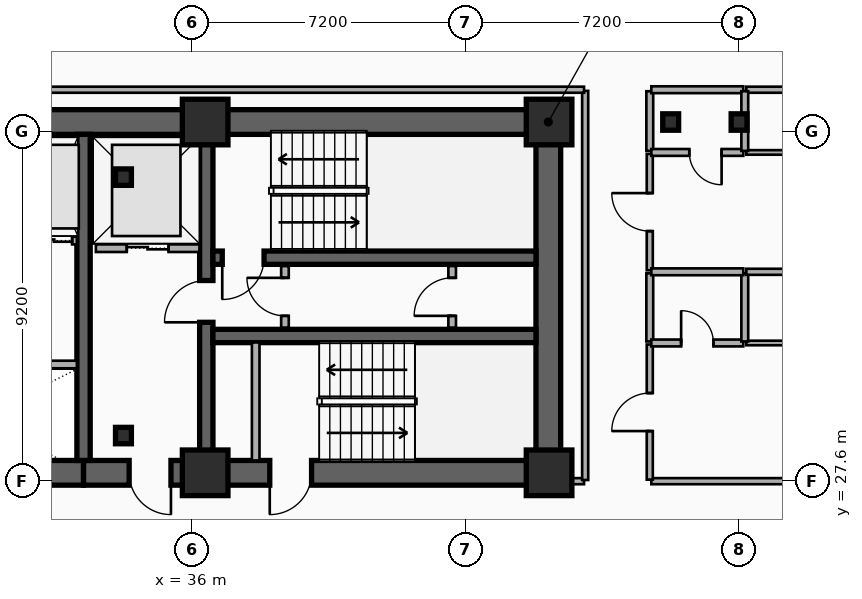
"""IFC4 building model, lengths in metres.
Left out: names, types, materials, properties, quantities, classifications, styles, units other than length and angle.
Written with IfcOpenShell. Run it as: python <this file> out.ifc"""

import sys

from ifc_helpers import new_model, si_unit, direction, frame, frame_2d, origin, origin_2d, place, context, subcontext, project, spatial, rectangle, i_section, extrude, element, fill, save


model = new_model("IFC4")
c1 = context("Model", 3, precision=1e-05, world=origin(), true_north=direction((0.0, 1.0)))
c2 = subcontext(c1, "Body", "Model", "MODEL_VIEW")
j1 = project(units=[si_unit("LENGTHUNIT", "METRE"), si_unit("PLANEANGLEUNIT", "RADIAN")], contexts=[c1])
p1 = place(None, origin())
s1 = spatial("IfcSite", under=j1, at=p1, CompositionType="ELEMENT")
p2 = place(p1, origin())
s2 = spatial("IfcBuilding", under=s1, at=p2, CompositionType="ELEMENT")
p3 = place(p2, frame((0.0, 0.0, 104.8)))
s3 = spatial("IfcBuildingStorey", under=s2, at=p3, CompositionType="ELEMENT", Elevation=104.8)
p4 = place(p3, frame((12.15, 37.05, 0.0), z_axis=(0.0, 0.0, 1.0), x_axis=(1.0, 0.0, 0.0)))
e1 = element("IfcWall", 1, at=p4, inside=s3, PredefinedType="SHEAR", context=c2, shape_type="SweptSolid", body=[
    extrude(rectangle(XDim=33.23, YDim=0.65, at=frame_2d((16.615, 0.0))), origin(), (0.0, 0.0, 1.0), 3.5),
])
p5 = place(p3, frame((33.15, 27.82, 0.0), z_axis=(0.0, 0.0, 1.0), x_axis=(-1.0, 0.0, 0.0)))
e2 = element("IfcWall", 2, at=p5, inside=s3, PredefinedType="SHEAR", context=c2, shape_type="SweptSolid", body=[
    extrude(rectangle(XDim=11.97, YDim=0.65, at=frame_2d((5.985, 0.0))), origin(), (0.0, 0.0, 1.0), 3.5),
])
p6 = place(p5, frame((6.1, 0.0, 0.0)))
e3 = element("IfcOpeningElement", 3, at=p6, cuts=e2, PredefinedType="OPENING", context=c2, shape_type="SweptSolid", body=[
    extrude(rectangle(XDim=1.6, YDim=2.2, at=frame_2d((0.8, 1.1))), frame((0.0, 0.335, 0.0), z_axis=(0.0, -1.0, 0.0), x_axis=(1.0, 0.0, 0.0)), (0.0, 0.0, 1.0), 0.67),
])
p7 = place(p3, frame((45.38, 27.82, 0.0), z_axis=(0.0, 0.0, 1.0), x_axis=(-1.0, 0.0, 0.0)))
e4 = element("IfcWall", 4, at=p7, inside=s3, PredefinedType="SHEAR", context=c2, shape_type="SweptSolid", body=[
    extrude(rectangle(XDim=12.23, YDim=0.65, at=frame_2d((6.115, 0.0))), origin(), (0.0, 0.0, 1.0), 3.5),
])
p8 = place(p7, frame((9.93, 0.0, 0.0)))
e5 = element("IfcOpeningElement", 5, at=p8, cuts=e4, PredefinedType="OPENING", context=c2, shape_type="SweptSolid", body=[
    extrude(rectangle(XDim=1.1, YDim=2.15, at=frame_2d((0.55, 1.075))), frame((0.0, 0.335, 0.0), z_axis=(0.0, -1.0, 0.0), x_axis=(1.0, 0.0, 0.0)), (0.0, 0.0, 1.0), 0.67),
])
p9 = place(p7, frame((6.23, 0.0, 0.0)))
e6 = element("IfcOpeningElement", 6, at=p9, cuts=e4, PredefinedType="OPENING", context=c2, shape_type="SweptSolid", body=[
    extrude(rectangle(XDim=1.1, YDim=2.15, at=frame_2d((0.55, 1.075))), frame((0.0, 0.335, 0.0), z_axis=(0.0, -1.0, 0.0), x_axis=(1.0, 0.0, 0.0)), (0.0, 0.0, 1.0), 0.67),
])
p10 = place(p3, frame((45.38, 28.145, 0.0), z_axis=(0.0, 0.0, 1.0), x_axis=(0.0, 1.0, 0.0)))
e7 = element("IfcWall", 7, at=p10, inside=s3, PredefinedType="SHEAR", context=c2, shape_type="SweptSolid", body=[
    extrude(rectangle(XDim=8.58, YDim=0.65, at=frame_2d((4.29, 0.0))), origin(), (0.0, 0.0, 1.0), 3.5),
])
p11 = place(p3, frame((33.15, 28.145, 0.0), z_axis=(0.0, 0.0, 1.0), x_axis=(0.0, 1.0, 0.0)))
e8 = element("IfcWall", 8, at=p11, inside=s3, PredefinedType="SHEAR", context=c2, shape_type="SweptSolid", body=[
    extrude(rectangle(XDim=8.58, YDim=0.35, at=frame_2d((4.29, 0.0))), origin(), (0.0, 0.0, 1.0), 3.5),
])
p12 = place(p3, frame((36.38, 28.145, 0.0), z_axis=(0.0, 0.0, 1.0), x_axis=(0.0, 1.0, 0.0)))
e9 = element("IfcWall", 9, at=p12, inside=s3, PredefinedType="SHEAR", context=c2, shape_type="SweptSolid", body=[
    extrude(rectangle(XDim=8.58, YDim=0.35, at=frame_2d((4.29, 0.0))), origin(), (0.0, 0.0, 1.0), 3.5),
])
p13 = place(p12, frame((3.635, 0.0, 0.0)))
e10 = element("IfcOpeningElement", 10, at=p13, cuts=e9, PredefinedType="OPENING", context=c2, shape_type="SweptSolid", body=[
    extrude(rectangle(XDim=1.1, YDim=2.15, at=frame_2d((0.55, 1.075))), frame((0.0, 0.185, 0.0), z_axis=(0.0, -1.0, 0.0), x_axis=(1.0, 0.0, 0.0)), (0.0, 0.0, 1.0), 0.37),
])
p14 = place(p3, frame((45.055, 33.48, 0.0), z_axis=(0.0, 0.0, 1.0), x_axis=(-1.0, 0.0, 0.0)))
e11 = element("IfcWall", 11, at=p14, inside=s3, PredefinedType="SHEAR", context=c2, shape_type="SweptSolid", body=[
    extrude(rectangle(XDim=8.5, YDim=0.35, at=frame_2d((4.25, 0.0))), origin(), (0.0, 0.0, 1.0), 3.5),
])
p15 = place(p14, frame((7.155, 0.0, 0.0)))
e12 = element("IfcOpeningElement", 12, at=p15, cuts=e11, PredefinedType="OPENING", context=c2, shape_type="SweptSolid", body=[
    extrude(rectangle(XDim=1.1, YDim=2.15, at=frame_2d((0.55, 1.075))), frame((0.0, 0.185, 0.0), z_axis=(0.0, -1.0, 0.0), x_axis=(1.0, 0.0, 0.0)), (0.0, 0.0, 1.0), 0.37),
])
p16 = place(p3, frame((36.555, 31.42, 0.0), z_axis=(0.0, 0.0, 1.0), x_axis=(1.0, 0.0, 0.0)))
e13 = element("IfcWall", 13, at=p16, inside=s3, PredefinedType="SHEAR", context=c2, shape_type="SweptSolid", body=[
    extrude(rectangle(XDim=8.5, YDim=0.35, at=frame_2d((4.25, 0.0))), origin(), (0.0, 0.0, 1.0), 3.5),
])
for number, where, z_axis, x_axis in (
    (14, (34.2, 28.8, 0.0), (0.0, 0.0, 1.0), (1.0, 0.0, 0.0)),
    (15, (34.2, 35.6, 0.0), (0.0, 0.0, 1.0), (1.0, 0.0, 0.0)),
):
    element("IfcColumn", number, at=place(p3, frame(where, z_axis=z_axis, x_axis=x_axis)), inside=s3, PredefinedType="COLUMN", context=c2, shape_type="SweptSolid", body=[
        extrude(i_section(OverallWidth=0.418, OverallDepth=0.432, WebThickness=0.035, FlangeThickness=0.056, FilletRadius=0.015, at=origin_2d()), origin(), (0.0, 0.0, 1.0), 3.5),
    ])
for number, where, z_axis, x_axis in (
    (16, (36.35, 27.82, 0.0), (0.0, 0.0, 1.0), (1.0, 0.0, 0.0)),
    (17, (36.35, 37.05, 0.0), (0.0, 0.0, 1.0), (1.0, 0.0, 0.0)),
    (18, (45.4, 27.82, 0.0), (0.0, 0.0, 1.0), (1.0, 0.0, 0.0)),
    (19, (45.4, 37.05, 0.0), (0.0, 0.0, 1.0), (1.0, 0.0, 0.0)),
):
    element("IfcColumn", number, at=place(p3, frame(where, z_axis=z_axis, x_axis=x_axis)), inside=s3, PredefinedType="COLUMN", context=c2, shape_type="SweptSolid", body=[
        extrude(rectangle(XDim=1.2, YDim=1.2, at=origin_2d()), origin(), (0.0, 0.0, 1.0), 3.5),
    ])
for number, where, z_axis, x_axis in (
    (20, (48.6, 37.05, 0.0), (0.0, 0.0, 1.0), (1.0, 0.0, 0.0)),
    (21, (50.4, 37.05, 0.0), (0.0, 0.0, 1.0), (1.0, 0.0, 0.0)),
):
    element("IfcColumn", number, at=place(p3, frame(where, z_axis=z_axis, x_axis=x_axis)), inside=s3, PredefinedType="COLUMN", context=c2, shape_type="SweptSolid", body=[
        extrude(i_section(OverallWidth=0.418, OverallDepth=0.432, WebThickness=0.035, FlangeThickness=0.056, FilletRadius=0.015, at=origin_2d()), origin(), (0.0, 0.0, 1.0), 3.5),
    ])
p17 = place(p3, frame((33.475, 33.73, 0.0), z_axis=(0.0, 0.0, 1.0), x_axis=(1.0, 0.0, 0.0)))
e22 = element("IfcWall", 22, at=p17, inside=s3, PredefinedType="PARTITIONING", context=c2, shape_type="SweptSolid", body=[
    extrude(rectangle(XDim=2.725, YDim=0.2, at=frame_2d((1.362, 0.0))), origin(), (0.0, 0.0, 1.0), 2.212),
])
p18 = place(p17, frame((0.812, 0.0, 0.0)))
e23 = element("IfcOpeningElement", 23, at=p18, cuts=e22, PredefinedType="OPENING", context=c2, shape_type="SweptSolid", body=[
    extrude(rectangle(XDim=1.1, YDim=2.15, at=frame_2d((0.55, 1.075))), frame((0.0, 0.11, 0.0), z_axis=(0.0, -1.0, 0.0), x_axis=(1.0, 0.0, 0.0)), (0.0, 0.0, 1.0), 0.22),
])
p19 = place(p3, frame((31.775, 30.67, 0.0), z_axis=(0.0, 0.0, 1.0), x_axis=(1.0, 0.0, 0.0)))
e24 = element("IfcWall", 24, at=p19, inside=s3, PredefinedType="PARTITIONING", context=c2, shape_type="SweptSolid", body=[
    extrude(rectangle(XDim=1.2, YDim=0.2, at=frame_2d((0.6, 0.0))), origin(), (0.0, 0.0, 1.0), 2.62),
])
p20 = place(p3, frame((31.775, 33.93, 0.0), z_axis=(0.0, 0.0, 1.0), x_axis=(1.0, 0.0, 0.0)))
e25 = element("IfcWall", 25, at=p20, inside=s3, PredefinedType="PARTITIONING", context=c2, shape_type="SweptSolid", body=[
    extrude(rectangle(XDim=1.2, YDim=0.2, at=frame_2d((0.6, 0.0))), origin(), (0.0, 0.0, 1.0), 3.24),
])
p21 = place(p20, frame((0.125, 0.0, 0.0)))
e26 = element("IfcOpeningElement", 26, at=p21, cuts=e25, PredefinedType="OPENING", context=c2, shape_type="SweptSolid", body=[
    extrude(rectangle(XDim=0.95, YDim=2.15, at=frame_2d((0.475, 1.075))), frame((0.0, 0.11, 0.0), z_axis=(0.0, -1.0, 0.0), x_axis=(1.0, 0.0, 0.0)), (0.0, 0.0, 1.0), 0.22),
])
p22 = place(p3, frame((37.68, 28.145, 0.0), z_axis=(0.0, 0.0, 1.0), x_axis=(0.0, 1.0, 0.0)))
e27 = element("IfcWall", 27, at=p22, inside=s3, PredefinedType="PARTITIONING", context=c2, shape_type="SweptSolid", body=[
    extrude(rectangle(XDim=3.105, YDim=0.2, at=frame_2d((1.552, 0.0))), origin(), (0.0, 0.0, 1.0), 2.62),
])
p23 = place(p3, frame((38.45, 31.64, 0.0), z_axis=(0.0, 0.0, 1.0), x_axis=(0.0, 1.0, 0.0)))
e28 = element("IfcWall", 28, at=p23, inside=s3, PredefinedType="PARTITIONING", context=c2, shape_type="SweptSolid", body=[
    extrude(rectangle(XDim=1.62, YDim=0.2, at=frame_2d((0.81, 0.0))), origin(), (0.0, 0.0, 1.0), 3.24),
])
p24 = place(p23, frame((0.31, 0.0, 0.0)))
e29 = element("IfcOpeningElement", 29, at=p24, cuts=e28, PredefinedType="OPENING", context=c2, shape_type="SweptSolid", body=[
    extrude(rectangle(XDim=1.0, YDim=2.15, at=frame_2d((0.5, 1.075))), frame((0.0, 0.11, 0.0), z_axis=(0.0, -1.0, 0.0), x_axis=(1.0, 0.0, 0.0)), (0.0, 0.0, 1.0), 0.22),
])
p25 = place(p3, frame((42.85, 31.64, 0.0), z_axis=(0.0, 0.0, 1.0), x_axis=(0.0, 1.0, 0.0)))
e30 = element("IfcWall", 30, at=p25, inside=s3, PredefinedType="PARTITIONING", context=c2, shape_type="SweptSolid", body=[
    extrude(rectangle(XDim=1.62, YDim=0.2, at=frame_2d((0.81, 0.0))), origin(), (0.0, 0.0, 1.0), 3.24),
])
p26 = place(p25, frame((0.31, 0.0, 0.0)))
e31 = element("IfcOpeningElement", 31, at=p26, cuts=e30, PredefinedType="OPENING", context=c2, shape_type="SweptSolid", body=[
    extrude(rectangle(XDim=1.0, YDim=2.15, at=frame_2d((0.5, 1.075))), frame((0.0, 0.11, 0.0), z_axis=(0.0, -1.0, 0.0), x_axis=(1.0, 0.0, 0.0)), (0.0, 0.0, 1.0), 0.22),
])
p27 = place(p3, frame((48.09, 27.6, 0.0), z_axis=(0.0, 0.0, 1.0), x_axis=(1.0, 0.0, 0.0)))
e32 = element("IfcWall", 32, at=p27, inside=s3, PredefinedType="PARTITIONING", context=c2, shape_type="SweptSolid", body=[
    extrude(rectangle(XDim=9.25, YDim=0.16, at=frame_2d((4.625, 0.0))), origin(), (0.0, 0.0, 1.0), 2.57),
])
p28 = place(p27, frame((4.125, 0.0, 0.0)))
e33 = element("IfcOpeningElement", 33, at=p28, cuts=e32, PredefinedType="OPENING", context=c2, shape_type="SweptSolid", body=[
    extrude(rectangle(XDim=1.0, YDim=2.15, at=frame_2d((0.5, 1.075))), frame((0.0, 0.09, 0.0), z_axis=(0.0, -1.0, 0.0), x_axis=(1.0, 0.0, 0.0)), (0.0, 0.0, 1.0), 0.18),
])
p29 = place(p3, frame((48.05, 27.64, 0.0), z_axis=(0.0, 0.0, 1.0), x_axis=(0.0, 1.0, 0.0)))
e34 = element("IfcWall", 34, at=p29, inside=s3, PredefinedType="PARTITIONING", context=c2, shape_type="SweptSolid", body=[
    extrude(rectangle(XDim=3.556, YDim=0.16, at=frame_2d((1.778, 0.0))), origin(), (0.0, 0.0, 1.0), 3.24),
])
p30 = place(p29, frame((1.278, 0.0, 0.0)))
e35 = element("IfcOpeningElement", 35, at=p30, cuts=e34, PredefinedType="OPENING", context=c2, shape_type="SweptSolid", body=[
    extrude(rectangle(XDim=1.0, YDim=2.15, at=frame_2d((0.5, 1.075))), frame((0.0, 0.09, 0.0), z_axis=(0.0, -1.0, 0.0), x_axis=(1.0, 0.0, 0.0)), (0.0, 0.0, 1.0), 0.18),
])
p31 = place(p3, frame((48.05, 31.276, 0.0), z_axis=(0.0, 0.0, 1.0), x_axis=(0.0, 1.0, 0.0)))
e36 = element("IfcWall", 36, at=p31, inside=s3, PredefinedType="PLUMBINGWALL", context=c2, shape_type="SweptSolid", body=[
    extrude(rectangle(XDim=1.793, YDim=0.18, at=frame_2d((0.896, 0.0))), origin(), (0.0, 0.0, 1.0), 3.24),
])
p32 = place(p3, frame((48.05, 33.149, 0.0), z_axis=(0.0, 0.0, 1.0), x_axis=(0.0, 1.0, 0.0)))
e37 = element("IfcWall", 37, at=p32, inside=s3, PredefinedType="PARTITIONING", context=c2, shape_type="SweptSolid", body=[
    extrude(rectangle(XDim=3.061, YDim=0.16, at=frame_2d((1.531, 0.0))), origin(), (0.0, 0.0, 1.0), 3.24),
])
p33 = place(p32, frame((1.031, 0.0, 0.0)))
e38 = element("IfcOpeningElement", 38, at=p33, cuts=e37, PredefinedType="OPENING", context=c2, shape_type="SweptSolid", body=[
    extrude(rectangle(XDim=1.0, YDim=2.15, at=frame_2d((0.5, 1.075))), frame((0.0, 0.09, 0.0), z_axis=(0.0, -1.0, 0.0), x_axis=(1.0, 0.0, 0.0)), (0.0, 0.0, 1.0), 0.18),
])
p34 = place(p3, frame((48.05, 36.29, 0.0), z_axis=(0.0, 0.0, 1.0), x_axis=(0.0, 1.0, 0.0)))
e39 = element("IfcWall", 39, at=p34, inside=s3, PredefinedType="PLUMBINGWALL", context=c2, shape_type="SweptSolid", body=[
    extrude(rectangle(XDim=1.57, YDim=0.18, at=frame_2d((0.785, 0.0))), origin(), (0.0, 0.0, 1.0), 2.72),
])
p35 = place(p3, frame((48.09, 37.9, 0.0), z_axis=(0.0, 0.0, 1.0), x_axis=(1.0, 0.0, 0.0)))
e40 = element("IfcWall", 40, at=p35, inside=s3, PredefinedType="PLUMBINGWALL", context=c2, shape_type="SweptSolid", body=[
    extrude(rectangle(XDim=2.42, YDim=0.18, at=frame_2d((1.21, 0.0))), origin(), (0.0, 0.0, 1.0), 3.24),
])
p36 = place(p3, frame((50.59, 37.9, 0.0), z_axis=(0.0, 0.0, 1.0), x_axis=(1.0, 0.0, 0.0)))
e41 = element("IfcWall", 41, at=p36, inside=s3, PredefinedType="PARTITIONING", context=c2, shape_type="SweptSolid", body=[
    extrude(rectangle(XDim=6.75, YDim=0.16, at=frame_2d((3.375, 0.0))), origin(), (0.0, 0.0, 1.0), 3.24),
])
p37 = place(p3, frame((48.09, 31.236, 0.0), z_axis=(0.0, 0.0, 1.0), x_axis=(1.0, 0.0, 0.0)))
e42 = element("IfcWall", 42, at=p37, inside=s3, PredefinedType="PLUMBINGWALL", context=c2, shape_type="SweptSolid", body=[
    extrude(rectangle(XDim=2.42, YDim=0.18, at=frame_2d((1.21, 0.0))), origin(), (0.0, 0.0, 1.0), 2.57),
])
p38 = place(p37, frame((0.785, 0.0, 0.0)))
e43 = element("IfcOpeningElement", 43, at=p38, cuts=e42, PredefinedType="OPENING", context=c2, shape_type="SweptSolid", body=[
    extrude(rectangle(XDim=0.85, YDim=2.1, at=frame_2d((0.425, 1.05))), frame((0.0, 0.1, 0.0), z_axis=(0.0, -1.0, 0.0), x_axis=(1.0, 0.0, 0.0)), (0.0, 0.0, 1.0), 0.2),
])
p39 = place(p3, frame((50.59, 31.236, 0.0), z_axis=(0.0, 0.0, 1.0), x_axis=(1.0, 0.0, 0.0)))
e44 = element("IfcWall", 44, at=p39, inside=s3, PredefinedType="PARTITIONING", context=c2, shape_type="SweptSolid", body=[
    extrude(rectangle(XDim=6.75, YDim=0.12, at=frame_2d((3.375, 0.0))), origin(), (0.0, 0.0, 1.0), 2.57),
])
p40 = place(p39, frame((2.925, 0.0, 0.0)))
e45 = element("IfcOpeningElement", 45, at=p40, cuts=e44, PredefinedType="OPENING", context=c2, shape_type="SweptSolid", body=[
    extrude(rectangle(XDim=0.9, YDim=2.1, at=frame_2d((0.45, 1.05))), frame((0.0, 0.07, 0.0), z_axis=(0.0, -1.0, 0.0), x_axis=(1.0, 0.0, 0.0)), (0.0, 0.0, 1.0), 0.14),
])
p41 = place(p3, frame((50.55, 31.276, 0.0), z_axis=(0.0, 0.0, 1.0), x_axis=(0.0, 1.0, 0.0)))
e46 = element("IfcWall", 46, at=p41, inside=s3, PredefinedType="PLUMBINGWALL", context=c2, shape_type="SweptSolid", body=[
    extrude(rectangle(XDim=1.793, YDim=0.18, at=frame_2d((0.896, 0.0))), origin(), (0.0, 0.0, 1.0), 2.57),
])
p42 = place(p3, frame((48.09, 33.109, 0.0), z_axis=(0.0, 0.0, 1.0), x_axis=(1.0, 0.0, 0.0)))
e47 = element("IfcWall", 47, at=p42, inside=s3, PredefinedType="PLUMBINGWALL", context=c2, shape_type="SweptSolid", body=[
    extrude(rectangle(XDim=2.42, YDim=0.18, at=frame_2d((1.21, 0.0))), origin(), (0.0, 0.0, 1.0), 2.57),
])
p43 = place(p3, frame((50.59, 33.109, 0.0), z_axis=(0.0, 0.0, 1.0), x_axis=(1.0, 0.0, 0.0)))
e48 = element("IfcWall", 48, at=p43, inside=s3, PredefinedType="PARTITIONING", context=c2, shape_type="SweptSolid", body=[
    extrude(rectangle(XDim=6.75, YDim=0.16, at=frame_2d((3.375, 0.0))), origin(), (0.0, 0.0, 1.0), 2.57),
])
p44 = place(p3, frame((50.51, 36.25, 0.0), z_axis=(0.0, 0.0, 1.0), x_axis=(-1.0, 0.0, 0.0)))
e49 = element("IfcWall", 49, at=p44, inside=s3, PredefinedType="PLUMBINGWALL", context=c2, shape_type="SweptSolid", body=[
    extrude(rectangle(XDim=2.42, YDim=0.18, at=frame_2d((1.21, 0.0))), origin(), (0.0, 0.0, 1.0), 2.57),
])
p45 = place(p44, frame((0.57, 0.0, 0.0)))
e50 = element("IfcOpeningElement", 50, at=p45, cuts=e49, PredefinedType="OPENING", context=c2, shape_type="SweptSolid", body=[
    extrude(rectangle(XDim=0.85, YDim=2.1, at=frame_2d((0.425, 1.05))), frame((0.0, 0.1, 0.0), z_axis=(0.0, -1.0, 0.0), x_axis=(1.0, 0.0, 0.0)), (0.0, 0.0, 1.0), 0.2),
])
p46 = place(p3, frame((50.59, 36.25, 0.0), z_axis=(0.0, 0.0, 1.0), x_axis=(1.0, 0.0, 0.0)))
e51 = element("IfcWall", 51, at=p46, inside=s3, PredefinedType="PARTITIONING", context=c2, shape_type="SweptSolid", body=[
    extrude(rectangle(XDim=6.75, YDim=0.12, at=frame_2d((3.375, 0.0))), origin(), (0.0, 0.0, 1.0), 2.57),
])
p47 = place(p46, frame((2.925, 0.0, 0.0)))
e52 = element("IfcOpeningElement", 52, at=p47, cuts=e51, PredefinedType="OPENING", context=c2, shape_type="SweptSolid", body=[
    extrude(rectangle(XDim=0.9, YDim=2.1, at=frame_2d((0.45, 1.05))), frame((0.0, 0.07, 0.0), z_axis=(0.0, -1.0, 0.0), x_axis=(1.0, 0.0, 0.0)), (0.0, 0.0, 1.0), 0.14),
])
p48 = place(p3, frame((50.55, 36.29, 0.0), z_axis=(0.0, 0.0, 1.0), x_axis=(0.0, 1.0, 0.0)))
e53 = element("IfcWall", 53, at=p48, inside=s3, PredefinedType="PLUMBINGWALL", context=c2, shape_type="SweptSolid", body=[
    extrude(rectangle(XDim=1.57, YDim=0.18, at=frame_2d((0.785, 0.0))), origin(), (0.0, 0.0, 1.0), 2.57),
])
p49 = place(p3, frame((45.41, 27.6, 0.0), z_axis=(0.0, 0.0, 1.0), x_axis=(1.0, 0.0, 0.0)))
e54 = element("IfcWall", 54, at=p49, inside=s3, PredefinedType="PARTITIONING", context=c2, shape_type="SweptSolid", body=[
    extrude(rectangle(XDim=0.91, YDim=0.16, at=frame_2d((0.455, 0.0))), origin(), (0.0, 0.0, 1.0), 2.28),
])
p50 = place(p3, frame((46.35, 27.63, 0.0), z_axis=(0.0, 0.0, 1.0), x_axis=(0.0, 1.0, 0.0)))
e55 = element("IfcWall", 55, at=p50, inside=s3, PredefinedType="PARTITIONING", context=c2, shape_type="SweptSolid", body=[
    extrude(rectangle(XDim=10.24, YDim=0.16, at=frame_2d((5.12, 0.0))), origin(), (0.0, 0.0, 1.0), 2.72),
])
p51 = place(p3, frame((11.28, 37.9, 0.0), z_axis=(0.0, 0.0, 1.0), x_axis=(1.0, 0.0, 0.0)))
e56 = element("IfcWall", 56, at=p51, inside=s3, PredefinedType="PARTITIONING", context=c2, shape_type="SweptSolid", body=[
    extrude(rectangle(XDim=35.04, YDim=0.16, at=frame_2d((17.52, 0.0))), origin(), (0.0, 0.0, 1.0), 3.24),
])
p52 = place(p18, origin())
e57 = element("IfcDoor", 57, at=p52, inside=s3, OperationType="DOUBLE_DOOR_SLIDING", PredefinedType="DOOR", context=c2, shape_type="SweptSolid", body=[
    extrude(rectangle(XDim=1.1, YDim=2.15, at=frame_2d((0.55, 1.075))), frame((0.0, 0.025, 0.0), z_axis=(0.0, -1.0, 0.0), x_axis=(1.0, 0.0, 0.0)), (0.0, 0.0, 1.0), 0.05),
])
fill(e23, e57)
p53 = place(p21, origin())
e58 = element("IfcDoor", 58, at=p53, inside=s3, OperationType="DOUBLE_DOOR_SLIDING", PredefinedType="DOOR", context=c2, shape_type="SweptSolid", body=[
    extrude(rectangle(XDim=0.95, YDim=2.15, at=frame_2d((0.475, 1.075))), frame((0.0, 0.025, 0.0), z_axis=(0.0, -1.0, 0.0), x_axis=(1.0, 0.0, 0.0)), (0.0, 0.0, 1.0), 0.05),
])
fill(e26, e58)
p54 = place(p15, origin())
e59 = element("IfcDoor", 59, at=p54, inside=s3, OperationType="SINGLE_SWING_RIGHT", PredefinedType="DOOR", context=c2, shape_type="SweptSolid", body=[
    extrude(rectangle(XDim=1.1, YDim=2.15, at=frame_2d((0.55, 1.075))), frame((0.0, 0.025, 0.0), z_axis=(0.0, -1.0, 0.0), x_axis=(1.0, 0.0, 0.0)), (0.0, 0.0, 1.0), 0.05),
])
fill(e12, e59)
p55 = place(p13, origin())
e60 = element("IfcDoor", 60, at=p55, inside=s3, OperationType="SINGLE_SWING_LEFT", PredefinedType="DOOR", context=c2, shape_type="SweptSolid", body=[
    extrude(rectangle(XDim=1.1, YDim=2.15, at=frame_2d((0.55, 1.075))), frame((0.0, 0.025, 0.0), z_axis=(0.0, -1.0, 0.0), x_axis=(1.0, 0.0, 0.0)), (0.0, 0.0, 1.0), 0.05),
])
fill(e10, e60)
p56 = place(p8, origin())
e61 = element("IfcDoor", 61, at=p56, inside=s3, OperationType="SINGLE_SWING_LEFT", PredefinedType="DOOR", context=c2, shape_type="SweptSolid", body=[
    extrude(rectangle(XDim=1.1, YDim=2.15, at=frame_2d((0.55, 1.075))), frame((0.0, 0.025, 0.0), z_axis=(0.0, -1.0, 0.0), x_axis=(1.0, 0.0, 0.0)), (0.0, 0.0, 1.0), 0.05),
])
fill(e5, e61)
p57 = place(p9, origin())
e62 = element("IfcDoor", 62, at=p57, inside=s3, OperationType="SINGLE_SWING_RIGHT", PredefinedType="DOOR", context=c2, shape_type="SweptSolid", body=[
    extrude(rectangle(XDim=1.1, YDim=2.15, at=frame_2d((0.55, 1.075))), frame((0.0, 0.025, 0.0), z_axis=(0.0, -1.0, 0.0), x_axis=(1.0, 0.0, 0.0)), (0.0, 0.0, 1.0), 0.05),
])
fill(e6, e62)
p58 = place(p24, origin())
e63 = element("IfcDoor", 63, at=p58, inside=s3, OperationType="SINGLE_SWING_RIGHT", PredefinedType="DOOR", context=c2, shape_type="SweptSolid", body=[
    extrude(rectangle(XDim=1.0, YDim=2.15, at=frame_2d((0.5, 1.075))), frame((0.0, 0.025, 0.0), z_axis=(0.0, -1.0, 0.0), x_axis=(1.0, 0.0, 0.0)), (0.0, 0.0, 1.0), 0.05),
])
fill(e29, e63)
p59 = place(p26, origin())
e64 = element("IfcDoor", 64, at=p59, inside=s3, OperationType="SINGLE_SWING_LEFT", PredefinedType="DOOR", context=c2, shape_type="SweptSolid", body=[
    extrude(rectangle(XDim=1.0, YDim=2.15, at=frame_2d((0.5, 1.075))), frame((0.0, 0.025, 0.0), z_axis=(0.0, -1.0, 0.0), x_axis=(1.0, 0.0, 0.0)), (0.0, 0.0, 1.0), 0.05),
])
fill(e31, e64)
p60 = place(p30, origin())
e65 = element("IfcDoor", 65, at=p60, inside=s3, OperationType="SINGLE_SWING_LEFT", PredefinedType="DOOR", context=c2, shape_type="SweptSolid", body=[
    extrude(rectangle(XDim=1.0, YDim=2.15, at=frame_2d((0.5, 1.075))), frame((0.0, 0.025, 0.0), z_axis=(0.0, -1.0, 0.0), x_axis=(1.0, 0.0, 0.0)), (0.0, 0.0, 1.0), 0.05),
])
fill(e35, e65)
p61 = place(p33, origin())
e66 = element("IfcDoor", 66, at=p61, inside=s3, OperationType="SINGLE_SWING_RIGHT", PredefinedType="DOOR", context=c2, shape_type="SweptSolid", body=[
    extrude(rectangle(XDim=1.0, YDim=2.15, at=frame_2d((0.5, 1.075))), frame((0.0, 0.025, 0.0), z_axis=(0.0, -1.0, 0.0), x_axis=(1.0, 0.0, 0.0)), (0.0, 0.0, 1.0), 0.05),
])
fill(e38, e66)
p62 = place(p38, origin())
e67 = element("IfcDoor", 67, at=p62, inside=s3, OperationType="SINGLE_SWING_LEFT", PredefinedType="DOOR", context=c2, shape_type="SweptSolid", body=[
    extrude(rectangle(XDim=0.85, YDim=2.1, at=frame_2d((0.425, 1.05))), frame((0.0, 0.025, 0.0), z_axis=(0.0, -1.0, 0.0), x_axis=(1.0, 0.0, 0.0)), (0.0, 0.0, 1.0), 0.05),
])
fill(e43, e67)
p63 = place(p45, origin())
e68 = element("IfcDoor", 68, at=p63, inside=s3, OperationType="SINGLE_SWING_LEFT", PredefinedType="DOOR", context=c2, shape_type="SweptSolid", body=[
    extrude(rectangle(XDim=0.85, YDim=2.1, at=frame_2d((0.425, 1.05))), frame((0.0, 0.025, 0.0), z_axis=(0.0, -1.0, 0.0), x_axis=(1.0, 0.0, 0.0)), (0.0, 0.0, 1.0), 0.05),
])
fill(e50, e68)
save(model, sys.argv[1])
